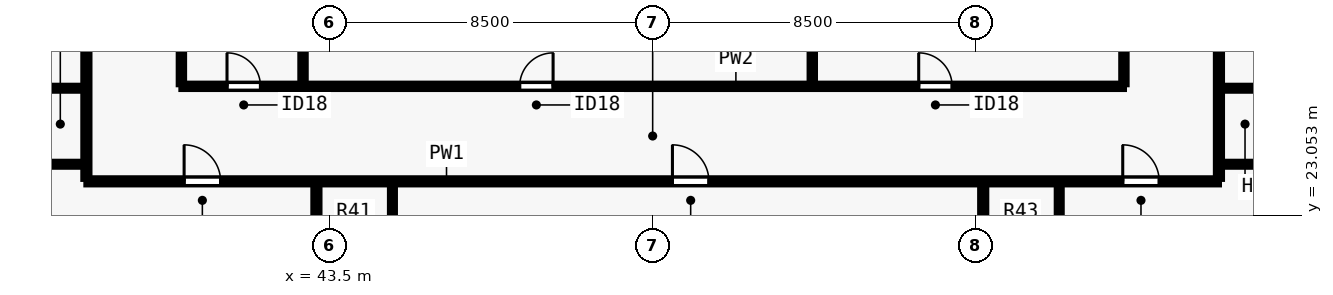
"""IFC4 building model, lengths in metres.
Left out: names, types, materials, properties, quantities, classifications, styles, units other than length and angle.
Written with IfcOpenShell. Run it as: python <this file> out.ifc"""

import sys

from ifc_helpers import new_model, si_unit, direction, frame, frame_2d, origin, place, context, subcontext, project, spatial, rectangle, extrude, element, fill, save


model = new_model("IFC4")
c1 = context("Model", 3, precision=1e-05, world=origin(), true_north=direction((0.0, 1.0)))
c2 = subcontext(c1, "Body", "Model", "MODEL_VIEW")
j1 = project(units=[si_unit("LENGTHUNIT", "METRE"), si_unit("PLANEANGLEUNIT", "RADIAN")], contexts=[c1])
p1 = place(None, origin())
s1 = spatial("IfcSite", under=j1, at=p1, CompositionType="ELEMENT")
p2 = place(p1, origin())
s2 = spatial("IfcBuilding", under=s1, at=p2, CompositionType="ELEMENT")
p3 = place(p2, frame((0.0, 0.0, 93.5)))
s3 = spatial("IfcBuildingStorey", under=s2, at=p3, CompositionType="ELEMENT", Elevation=93.5)
p4 = place(p3, frame((37.1, 23.95, 0.0), z_axis=(0.0, 0.0, 1.0), x_axis=(1.0, 0.0, 0.0)))
e1 = element("IfcWall", 1, at=p4, inside=s3, PredefinedType="PARTITIONING", context=c2, shape_type="SweptSolid", body=[
    extrude(rectangle(XDim=29.8, YDim=0.16, at=frame_2d((14.9, 0.0))), origin(), (0.0, 0.0, 1.0), 3.24),
])
p5 = place(p4, frame((2.571, 0.0, 0.0)))
e2 = element("IfcOpeningElement", 2, at=p5, cuts=e1, PredefinedType="OPENING", context=c2, shape_type="SweptSolid", body=[
    extrude(rectangle(XDim=0.96, YDim=2.15, at=frame_2d((0.48, 1.075))), frame((0.0, 0.09, 0.0), z_axis=(0.0, -1.0, 0.0), x_axis=(1.0, 0.0, 0.0)), (0.0, 0.0, 1.0), 0.18),
])
p6 = place(p4, frame((15.42, 0.0, 0.0)))
e3 = element("IfcOpeningElement", 3, at=p6, cuts=e1, PredefinedType="OPENING", context=c2, shape_type="SweptSolid", body=[
    extrude(rectangle(XDim=0.96, YDim=2.15, at=frame_2d((0.48, 1.075))), frame((0.0, 0.09, 0.0), z_axis=(0.0, -1.0, 0.0), x_axis=(1.0, 0.0, 0.0)), (0.0, 0.0, 1.0), 0.18),
])
p7 = place(p4, frame((27.269, 0.0, 0.0)))
e4 = element("IfcOpeningElement", 4, at=p7, cuts=e1, PredefinedType="OPENING", context=c2, shape_type="SweptSolid", body=[
    extrude(rectangle(XDim=0.96, YDim=2.15, at=frame_2d((0.48, 1.075))), frame((0.0, 0.09, 0.0), z_axis=(0.0, -1.0, 0.0), x_axis=(1.0, 0.0, 0.0)), (0.0, 0.0, 1.0), 0.18),
])
p8 = place(p3, frame((37.1, 24.015, 0.0), z_axis=(0.0, 0.0, 1.0), x_axis=(0.0, 1.0, 0.0)))
e5 = element("IfcWall", 5, at=p8, inside=s3, PredefinedType="PARTITIONING", context=c2, shape_type="SweptSolid", body=[
    extrude(rectangle(XDim=29.97, YDim=0.16, at=frame_2d((14.985, 0.0))), origin(), (0.0, 0.0, 1.0), 3.24),
])
p9 = place(p8, frame((8.134, 0.0, 0.0)))
e6 = element("IfcOpeningElement", 6, at=p9, cuts=e5, PredefinedType="OPENING", context=c2, shape_type="SweptSolid", body=[
    extrude(rectangle(XDim=0.96, YDim=2.15, at=frame_2d((0.48, 1.075))), frame((0.0, 0.09, 0.0), z_axis=(0.0, -1.0, 0.0), x_axis=(1.0, 0.0, 0.0)), (0.0, 0.0, 1.0), 0.18),
])
p10 = place(p8, frame((22.934, 0.0, 0.0)))
e7 = element("IfcOpeningElement", 7, at=p10, cuts=e5, PredefinedType="OPENING", context=c2, shape_type="SweptSolid", body=[
    extrude(rectangle(XDim=0.96, YDim=2.15, at=frame_2d((0.48, 1.075))), frame((0.0, 0.09, 0.0), z_axis=(0.0, -1.0, 0.0), x_axis=(1.0, 0.0, 0.0)), (0.0, 0.0, 1.0), 0.18),
])
p11 = place(p3, frame((66.9, 24.015, 0.0), z_axis=(0.0, 0.0, 1.0), x_axis=(0.0, 1.0, 0.0)))
e8 = element("IfcWall", 8, at=p11, inside=s3, PredefinedType="PARTITIONING", context=c2, shape_type="SweptSolid", body=[
    extrude(rectangle(XDim=29.97, YDim=0.16, at=frame_2d((14.985, 0.0))), origin(), (0.0, 0.0, 1.0), 3.24),
])
p12 = place(p11, frame((3.911, 0.0, 0.0)))
e9 = element("IfcOpeningElement", 9, at=p12, cuts=e8, PredefinedType="OPENING", context=c2, shape_type="SweptSolid", body=[
    extrude(rectangle(XDim=0.96, YDim=2.15, at=frame_2d((0.48, 1.075))), frame((0.0, 0.09, 0.0), z_axis=(0.0, -1.0, 0.0), x_axis=(1.0, 0.0, 0.0)), (0.0, 0.0, 1.0), 0.18),
])
p13 = place(p11, frame((9.544, 0.0, 0.0)))
e10 = element("IfcOpeningElement", 10, at=p13, cuts=e8, PredefinedType="OPENING", context=c2, shape_type="SweptSolid", body=[
    extrude(rectangle(XDim=0.96, YDim=2.15, at=frame_2d((0.48, 1.075))), frame((0.0, 0.09, 0.0), z_axis=(0.0, -1.0, 0.0), x_axis=(1.0, 0.0, 0.0)), (0.0, 0.0, 1.0), 0.18),
])
p14 = place(p11, frame((15.625, 0.0, 0.0)))
e11 = element("IfcOpeningElement", 11, at=p14, cuts=e8, PredefinedType="OPENING", context=c2, shape_type="SweptSolid", body=[
    extrude(rectangle(XDim=0.96, YDim=2.15, at=frame_2d((0.48, 1.075))), frame((0.0, 0.09, 0.0), z_axis=(0.0, -1.0, 0.0), x_axis=(1.0, 0.0, 0.0)), (0.0, 0.0, 1.0), 0.18),
])
p15 = place(p11, frame((21.584, 0.0, 0.0)))
e12 = element("IfcOpeningElement", 12, at=p15, cuts=e8, PredefinedType="OPENING", context=c2, shape_type="SweptSolid", body=[
    extrude(rectangle(XDim=0.96, YDim=2.15, at=frame_2d((0.48, 1.075))), frame((0.0, 0.09, 0.0), z_axis=(0.0, -1.0, 0.0), x_axis=(1.0, 0.0, 0.0)), (0.0, 0.0, 1.0), 0.18),
])
p16 = place(p11, frame((27.494, 0.0, 0.0)))
e13 = element("IfcOpeningElement", 13, at=p16, cuts=e8, PredefinedType="OPENING", context=c2, shape_type="SweptSolid", body=[
    extrude(rectangle(XDim=0.96, YDim=2.15, at=frame_2d((0.48, 1.075))), frame((0.0, 0.09, 0.0), z_axis=(0.0, -1.0, 0.0), x_axis=(1.0, 0.0, 0.0)), (0.0, 0.0, 1.0), 0.18),
])
p17 = place(p3, frame((39.6, 26.45, 0.0), z_axis=(0.0, 0.0, 1.0), x_axis=(1.0, 0.0, 0.0)))
e14 = element("IfcWall", 14, at=p17, inside=s3, PredefinedType="PARTITIONING", context=c2, shape_type="SweptSolid", body=[
    extrude(rectangle(XDim=24.8, YDim=0.14, at=frame_2d((12.4, 0.0))), origin(), (0.0, 0.0, 1.0), 3.24),
])
p18 = place(p17, frame((1.2, 0.0, 0.0)))
e15 = element("IfcOpeningElement", 15, at=p18, cuts=e14, PredefinedType="OPENING", context=c2, shape_type="SweptSolid", body=[
    extrude(rectangle(XDim=0.88, YDim=2.1, at=frame_2d((0.44, 1.05))), frame((0.0, 0.08, 0.0), z_axis=(0.0, -1.0, 0.0), x_axis=(1.0, 0.0, 0.0)), (0.0, 0.0, 1.0), 0.16),
])
p19 = place(p17, frame((8.9, 0.0, 0.0)))
e16 = element("IfcOpeningElement", 16, at=p19, cuts=e14, PredefinedType="OPENING", context=c2, shape_type="SweptSolid", body=[
    extrude(rectangle(XDim=0.88, YDim=2.1, at=frame_2d((0.44, 1.05))), frame((0.0, 0.08, 0.0), z_axis=(0.0, -1.0, 0.0), x_axis=(1.0, 0.0, 0.0)), (0.0, 0.0, 1.0), 0.16),
])
p20 = place(p17, frame((19.4, 0.0, 0.0)))
e17 = element("IfcOpeningElement", 17, at=p20, cuts=e14, PredefinedType="OPENING", context=c2, shape_type="SweptSolid", body=[
    extrude(rectangle(XDim=0.88, YDim=2.1, at=frame_2d((0.44, 1.05))), frame((0.0, 0.08, 0.0), z_axis=(0.0, -1.0, 0.0), x_axis=(1.0, 0.0, 0.0)), (0.0, 0.0, 1.0), 0.16),
])
p21 = place(p3, frame((39.6, 26.505, 0.0), z_axis=(0.0, 0.0, 1.0), x_axis=(0.0, 1.0, 0.0)))
e18 = element("IfcWall", 18, at=p21, inside=s3, PredefinedType="PARTITIONING", context=c2, shape_type="SweptSolid", body=[
    extrude(rectangle(XDim=12.245, YDim=0.14, at=frame_2d((6.123, 0.0))), origin(), (0.0, 0.0, 1.0), 3.24),
])
p22 = place(p21, frame((1.045, 0.0, 0.0)))
e19 = element("IfcOpeningElement", 19, at=p22, cuts=e18, PredefinedType="OPENING", context=c2, shape_type="SweptSolid", body=[
    extrude(rectangle(XDim=0.88, YDim=2.1, at=frame_2d((0.44, 1.05))), frame((0.0, 0.08, 0.0), z_axis=(0.0, -1.0, 0.0), x_axis=(1.0, 0.0, 0.0)), (0.0, 0.0, 1.0), 0.16),
])
p23 = place(p21, frame((9.295, 0.0, 0.0)))
e20 = element("IfcOpeningElement", 20, at=p23, cuts=e18, PredefinedType="OPENING", context=c2, shape_type="SweptSolid", body=[
    extrude(rectangle(XDim=0.88, YDim=2.1, at=frame_2d((0.44, 1.05))), frame((0.0, 0.08, 0.0), z_axis=(0.0, -1.0, 0.0), x_axis=(1.0, 0.0, 0.0)), (0.0, 0.0, 1.0), 0.16),
])
p24 = place(p3, frame((64.4, 26.505, 0.0), z_axis=(0.0, 0.0, 1.0), x_axis=(0.0, 1.0, 0.0)))
e21 = element("IfcWall", 21, at=p24, inside=s3, PredefinedType="PARTITIONING", context=c2, shape_type="SweptSolid", body=[
    extrude(rectangle(XDim=12.245, YDim=0.14, at=frame_2d((6.123, 0.0))), origin(), (0.0, 0.0, 1.0), 3.24),
])
p25 = place(p24, frame((2.445, 0.0, 0.0)))
e22 = element("IfcOpeningElement", 22, at=p25, cuts=e21, PredefinedType="OPENING", context=c2, shape_type="SweptSolid", body=[
    extrude(rectangle(XDim=0.88, YDim=2.1, at=frame_2d((0.44, 1.05))), frame((0.0, 0.08, 0.0), z_axis=(0.0, -1.0, 0.0), x_axis=(1.0, 0.0, 0.0)), (0.0, 0.0, 1.0), 0.16),
])
p26 = place(p3, frame((42.8, 26.505, 0.0), z_axis=(0.0, 0.0, 1.0), x_axis=(0.0, 1.0, 0.0)))
e23 = element("IfcWall", 23, at=p26, inside=s3, PredefinedType="PARTITIONING", context=c2, shape_type="SweptSolid", body=[
    extrude(rectangle(XDim=3.995, YDim=0.14, at=frame_2d((1.998, 0.0))), origin(), (0.0, 0.0, 1.0), 2.399),
])
p27 = place(p3, frame((56.2, 26.505, 0.0), z_axis=(0.0, 0.0, 1.0), x_axis=(0.0, 1.0, 0.0)))
e24 = element("IfcWall", 24, at=p27, inside=s3, PredefinedType="PARTITIONING", context=c2, shape_type="SweptSolid", body=[
    extrude(rectangle(XDim=3.735, YDim=0.14, at=frame_2d((1.868, 0.0))), origin(), (0.0, 0.0, 1.0), 2.809),
])
p28 = place(p3, frame((43.153, 13.845, 0.0), z_axis=(0.0, 0.0, 1.0), x_axis=(0.0, 1.0, 0.0)))
e25 = element("IfcWall", 25, at=p28, inside=s3, PredefinedType="PARTITIONING", context=c2, shape_type="SweptSolid", body=[
    extrude(rectangle(XDim=10.04, YDim=0.16, at=frame_2d((5.02, 0.0))), origin(), (0.0, 0.0, 1.0), 3.24),
])
p29 = place(p3, frame((45.153, 21.65, 0.0), z_axis=(0.0, 0.0, 1.0), x_axis=(0.0, 1.0, 0.0)))
e26 = element("IfcWall", 26, at=p29, inside=s3, PredefinedType="PLUMBINGWALL", context=c2, shape_type="SweptSolid", body=[
    extrude(rectangle(XDim=2.235, YDim=0.13, at=frame_2d((1.118, 0.0))), origin(), (0.0, 0.0, 1.0), 3.24),
])
p30 = place(p3, frame((60.698, 13.845, 0.0), z_axis=(0.0, 0.0, 1.0), x_axis=(0.0, 1.0, 0.0)))
e27 = element("IfcWall", 27, at=p30, inside=s3, PredefinedType="PARTITIONING", context=c2, shape_type="SweptSolid", body=[
    extrude(rectangle(XDim=10.04, YDim=0.16, at=frame_2d((5.02, 0.0))), origin(), (0.0, 0.0, 1.0), 3.24),
])
p31 = place(p3, frame((62.698, 21.65, 0.0), z_axis=(0.0, 0.0, 1.0), x_axis=(0.0, 1.0, 0.0)))
e28 = element("IfcWall", 28, at=p31, inside=s3, PredefinedType="PLUMBINGWALL", context=c2, shape_type="SweptSolid", body=[
    extrude(rectangle(XDim=2.235, YDim=0.13, at=frame_2d((1.118, 0.0))), origin(), (0.0, 0.0, 1.0), 3.24),
])
p32 = place(p3, frame((34.8, 24.4, 0.0), z_axis=(0.0, 0.0, 1.0), x_axis=(1.0, 0.0, 0.0)))
e29 = element("IfcWall", 29, at=p32, inside=s3, PredefinedType="PLUMBINGWALL", context=c2, shape_type="SweptSolid", body=[
    extrude(rectangle(XDim=2.235, YDim=0.13, at=frame_2d((1.117, 0.0))), origin(), (0.0, 0.0, 1.0), 2.809),
])
p33 = place(p3, frame((34.8, 26.4, 0.0), z_axis=(0.0, 0.0, 1.0), x_axis=(1.0, 0.0, 0.0)))
e30 = element("IfcWall", 30, at=p33, inside=s3, PredefinedType="PLUMBINGWALL", context=c2, shape_type="SweptSolid", body=[
    extrude(rectangle(XDim=2.235, YDim=0.13, at=frame_2d((1.117, 0.0))), origin(), (0.0, 0.0, 1.0), 3.24),
])
p34 = place(p3, frame((66.965, 24.4, 0.0), z_axis=(0.0, 0.0, 1.0), x_axis=(1.0, 0.0, 0.0)))
e31 = element("IfcWall", 31, at=p34, inside=s3, PredefinedType="PLUMBINGWALL", context=c2, shape_type="SweptSolid", body=[
    extrude(rectangle(XDim=2.235, YDim=0.13, at=frame_2d((1.117, 0.0))), origin(), (0.0, 0.0, 1.0), 2.809),
])
p35 = place(p3, frame((66.965, 26.4, 0.0), z_axis=(0.0, 0.0, 1.0), x_axis=(1.0, 0.0, 0.0)))
e32 = element("IfcWall", 32, at=p35, inside=s3, PredefinedType="PLUMBINGWALL", context=c2, shape_type="SweptSolid", body=[
    extrude(rectangle(XDim=2.235, YDim=0.13, at=frame_2d((1.117, 0.0))), origin(), (0.0, 0.0, 1.0), 3.24),
])
p36 = place(p18, origin())
e33 = element("IfcDoor", 33, at=p36, inside=s3, OperationType="SINGLE_SWING_LEFT", PredefinedType="DOOR", context=c2, shape_type="SweptSolid", body=[
    extrude(rectangle(XDim=0.88, YDim=2.1, at=frame_2d((0.44, 1.05))), frame((0.0, 0.025, 0.0), z_axis=(0.0, -1.0, 0.0), x_axis=(1.0, 0.0, 0.0)), (0.0, 0.0, 1.0), 0.05),
])
fill(e15, e33)
p37 = place(p19, origin())
e34 = element("IfcDoor", 34, at=p37, inside=s3, OperationType="SINGLE_SWING_RIGHT", PredefinedType="DOOR", context=c2, shape_type="SweptSolid", body=[
    extrude(rectangle(XDim=0.88, YDim=2.1, at=frame_2d((0.44, 1.05))), frame((0.0, 0.025, 0.0), z_axis=(0.0, -1.0, 0.0), x_axis=(1.0, 0.0, 0.0)), (0.0, 0.0, 1.0), 0.05),
])
fill(e16, e34)
p38 = place(p20, origin())
e35 = element("IfcDoor", 35, at=p38, inside=s3, OperationType="SINGLE_SWING_LEFT", PredefinedType="DOOR", context=c2, shape_type="SweptSolid", body=[
    extrude(rectangle(XDim=0.88, YDim=2.1, at=frame_2d((0.44, 1.05))), frame((0.0, 0.025, 0.0), z_axis=(0.0, -1.0, 0.0), x_axis=(1.0, 0.0, 0.0)), (0.0, 0.0, 1.0), 0.05),
])
fill(e17, e35)
p39 = place(p5, origin())
e36 = element("IfcDoor", 36, at=p39, inside=s3, OperationType="SINGLE_SWING_LEFT", PredefinedType="DOOR", context=c2, shape_type="SweptSolid", body=[
    extrude(rectangle(XDim=0.96, YDim=2.15, at=frame_2d((0.48, 1.075))), frame((0.0, 0.025, 0.0), z_axis=(0.0, -1.0, 0.0), x_axis=(1.0, 0.0, 0.0)), (0.0, 0.0, 1.0), 0.05),
])
fill(e2, e36)
p40 = place(p6, origin())
e37 = element("IfcDoor", 37, at=p40, inside=s3, OperationType="SINGLE_SWING_LEFT", PredefinedType="DOOR", context=c2, shape_type="SweptSolid", body=[
    extrude(rectangle(XDim=0.96, YDim=2.15, at=frame_2d((0.48, 1.075))), frame((0.0, 0.025, 0.0), z_axis=(0.0, -1.0, 0.0), x_axis=(1.0, 0.0, 0.0)), (0.0, 0.0, 1.0), 0.05),
])
fill(e3, e37)
p41 = place(p7, origin())
e38 = element("IfcDoor", 38, at=p41, inside=s3, OperationType="SINGLE_SWING_LEFT", PredefinedType="DOOR", context=c2, shape_type="SweptSolid", body=[
    extrude(rectangle(XDim=0.96, YDim=2.15, at=frame_2d((0.48, 1.075))), frame((0.0, 0.025, 0.0), z_axis=(0.0, -1.0, 0.0), x_axis=(1.0, 0.0, 0.0)), (0.0, 0.0, 1.0), 0.05),
])
fill(e4, e38)
save(model, sys.argv[1])
